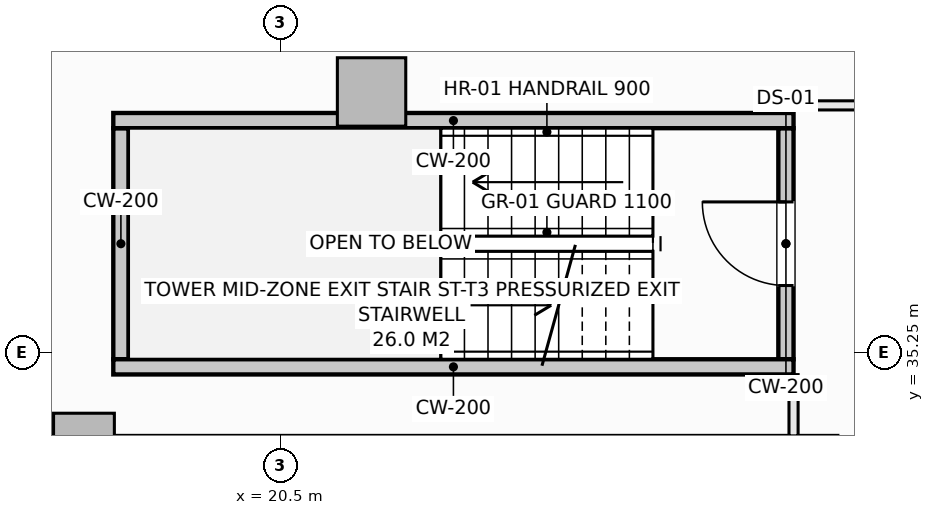
"""IFC4 building model, lengths in metres.
Left out: names, types, materials, properties, quantities, classifications, styles, units other than length and angle.
Written with IfcOpenShell. Run it as: python <this file> out.ifc"""

import sys

from ifc_helpers import new_model, si_unit, direction, frame, frame_2d, origin, origin_2d, place, context, subcontext, project, spatial, rectangle, extrude, element, fill, save


model = new_model("IFC4")
c1 = context("Model", 3, precision=1e-05, world=origin(), true_north=direction((0.0, 1.0)))
c2 = subcontext(c1, "Body", "Model", "MODEL_VIEW")
j1 = project(units=[si_unit("LENGTHUNIT", "METRE"), si_unit("PLANEANGLEUNIT", "RADIAN")], contexts=[c1])
p1 = place(None, origin())
s1 = spatial("IfcSite", under=j1, at=p1, CompositionType="ELEMENT")
p2 = place(p1, origin())
s2 = spatial("IfcBuilding", under=s1, at=p2, CompositionType="ELEMENT")
p3 = place(p2, frame((0.0, 0.0, 115.5)))
s3 = spatial("IfcBuildingStorey", under=s2, at=p3, CompositionType="ELEMENT", Elevation=115.5)
p4 = place(p3, frame((21.698, 38.677, -0.27), z_axis=(0.0, 0.0, 1.0), x_axis=(1.0, 0.0, 0.0)))
e1 = element("IfcColumn", 1, at=p4, inside=s3, PredefinedType="COLUMN", context=c2, shape_type="SweptSolid", body=[
    extrude(rectangle(XDim=0.9, YDim=0.9, at=origin_2d()), origin(), (0.0, 0.0, 1.0), 3.4),
])
p5 = place(p3, frame((17.914, 34.05, -0.27), z_axis=(0.0, 0.0, 1.0), x_axis=(1.0, 0.0, 0.0)))
e2 = element("IfcColumn", 2, at=p5, inside=s3, PredefinedType="PILASTER", context=c2, shape_type="SweptSolid", body=[
    extrude(rectangle(XDim=0.8, YDim=0.8, at=origin_2d()), origin(), (0.0, 0.0, 1.0), 3.4),
])
p6 = place(p3, frame((27.15, 35.16, -0.27), z_axis=(0.0, 0.0, 1.0), x_axis=(0.0, 1.0, 0.0)))
e3 = element("IfcWall", 3, at=p6, inside=s3, PredefinedType="SHEAR", context=c2, shape_type="SweptSolid", body=[
    extrude(rectangle(XDim=3.04, YDim=0.2, at=frame_2d((1.52, 0.0))), origin(), (0.0, 0.0, 1.0), 3.4),
])
p7 = place(p6, frame((0.97, 0.0, 0.27)))
e4 = element("IfcOpeningElement", 4, at=p7, cuts=e3, PredefinedType="OPENING", context=c2, shape_type="SweptSolid", body=[
    extrude(rectangle(XDim=1.1, YDim=2.15, at=frame_2d((0.55, 1.075))), frame((0.0, 0.11, 0.0), z_axis=(0.0, -1.0, 0.0), x_axis=(1.0, 0.0, 0.0)), (0.0, 0.0, 1.0), 0.22),
])
p8 = place(p3, frame((18.4, 35.16, -0.27), z_axis=(0.0, 0.0, 1.0), x_axis=(0.0, 1.0, 0.0)))
e5 = element("IfcWall", 5, at=p8, inside=s3, PredefinedType="SHEAR", context=c2, shape_type="SweptSolid", body=[
    extrude(rectangle(XDim=3.04, YDim=0.2, at=frame_2d((1.52, 0.0))), origin(), (0.0, 0.0, 1.0), 3.4),
])
for number, where, z_axis, x_axis in (
    (6, (18.3, 38.3, -0.27), (0.0, 0.0, 1.0), (1.0, 0.0, 0.0)),
    (7, (18.3, 35.06, -0.27), (0.0, 0.0, 1.0), (1.0, 0.0, 0.0)),
):
    element("IfcWall", number, at=place(p3, frame(where, z_axis=z_axis, x_axis=x_axis)), inside=s3, PredefinedType="SHEAR", context=c2, shape_type="SweptSolid", body=[
        extrude(rectangle(XDim=8.95, YDim=0.2, at=frame_2d((4.475, 0.0))), origin(), (0.0, 0.0, 1.0), 3.4),
    ])
p9 = place(p3, frame((27.25, 34.152, 0.0), z_axis=(0.0, 0.0, 1.0), x_axis=(0.0, 1.0, 0.0)))
e8 = element("IfcWall", 8, at=p9, inside=s3, PredefinedType="PARTITIONING", context=c2, shape_type="SweptSolid", body=[
    extrude(rectangle(XDim=0.806, YDim=0.12, at=frame_2d((0.403, 0.0))), origin(), (0.0, 0.0, 1.0), 3.13),
])
p10 = place(p3, frame((27.25, 38.5, 0.0), z_axis=(0.0, 0.0, 1.0), x_axis=(1.0, 0.0, 0.0)))
e9 = element("IfcWall", 9, at=p10, inside=s3, PredefinedType="PARTITIONING", context=c2, shape_type="SweptSolid", body=[
    extrude(rectangle(XDim=2.53, YDim=0.12, at=frame_2d((1.265, 0.0))), origin(), (0.0, 0.0, 1.0), 3.13),
])
p11 = place(p7, origin())
e10 = element("IfcDoor", 10, at=p11, inside=s3, OperationType="SINGLE_SWING_RIGHT", PredefinedType="DOOR", context=c2, shape_type="SweptSolid", body=[
    extrude(rectangle(XDim=1.1, YDim=2.15, at=frame_2d((0.55, 1.075))), frame((0.0, 0.025, 0.0), z_axis=(0.0, -1.0, 0.0), x_axis=(1.0, 0.0, 0.0)), (0.0, 0.0, 1.0), 0.05),
])
fill(e4, e10)
save(model, sys.argv[1])
